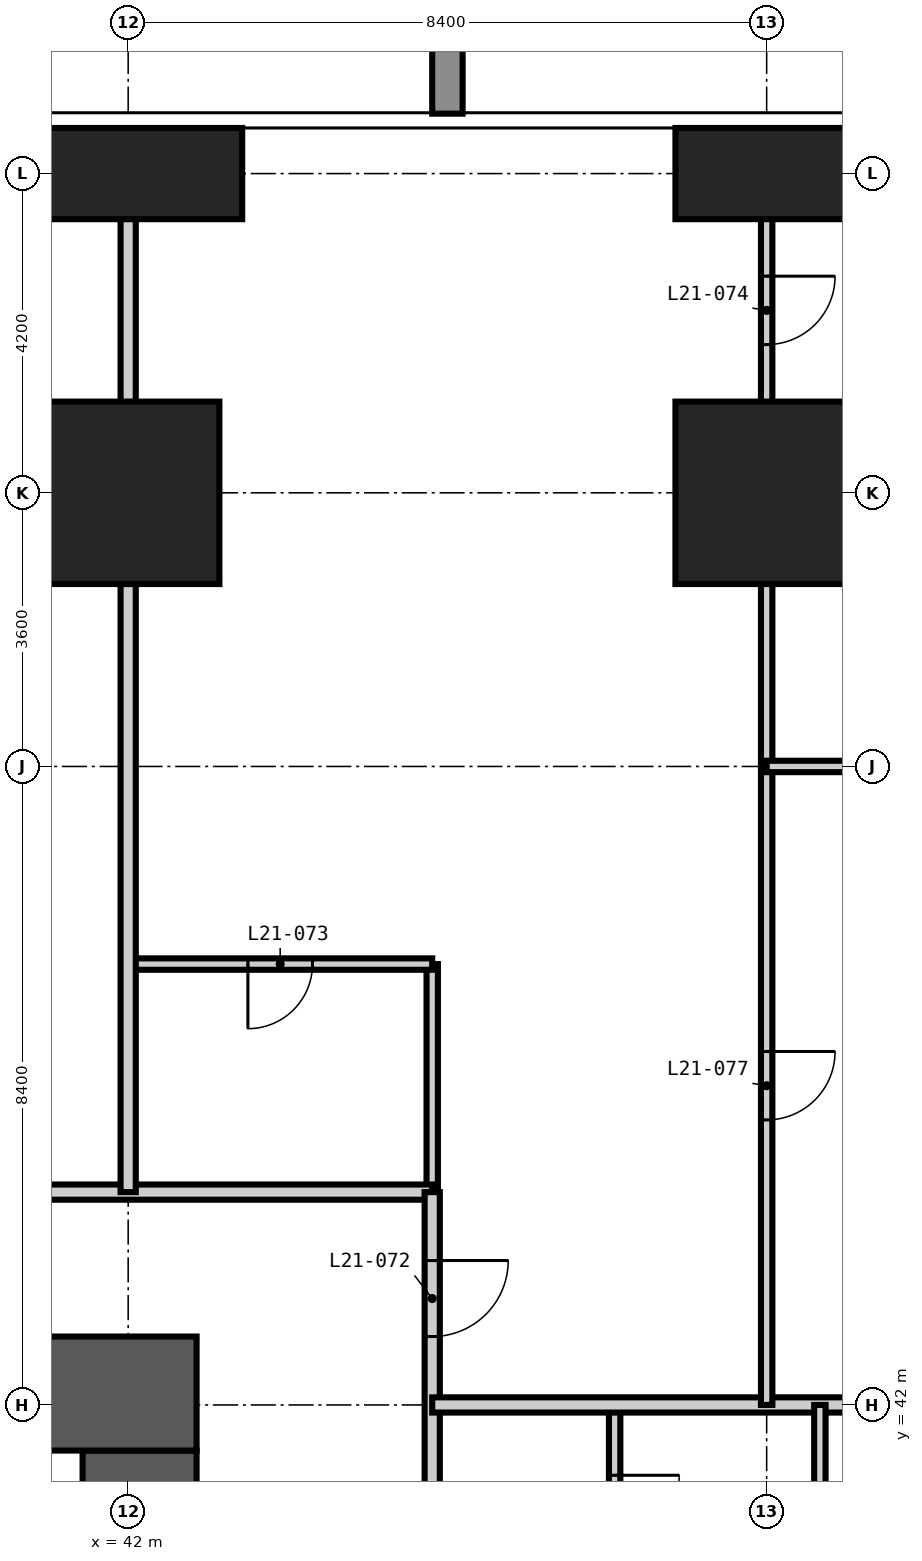
"""IFC4 building model, lengths in metres.
Left out: names, types, materials, properties, quantities, classifications, styles, units other than length and angle.
Written with IfcOpenShell. Run it as: python <this file> out.ifc"""

import sys

from ifc_helpers import new_model, si_unit, direction, frame, frame_2d, origin, origin_2d, place, context, subcontext, project, spatial, rectangle, extrude, element, fill, save


model = new_model("IFC4")
c1 = context("Model", 3, precision=1e-05, world=origin(), true_north=direction((0.0, 1.0)))
c2 = subcontext(c1, "Body", "Model", "MODEL_VIEW")
j1 = project(units=[si_unit("LENGTHUNIT", "METRE"), si_unit("PLANEANGLEUNIT", "RADIAN")], contexts=[c1])
p1 = place(None, origin())
s1 = spatial("IfcSite", under=j1, at=p1, CompositionType="ELEMENT")
p2 = place(p1, origin())
s2 = spatial("IfcBuilding", under=s1, at=p2, CompositionType="ELEMENT")
p3 = place(p2, frame((0.0, 0.0, 84.6)))
s3 = spatial("IfcBuildingStorey", under=s2, at=p3, CompositionType="ELEMENT", Elevation=84.6)
p4 = place(p3, frame((42.0, 54.0, -0.35), z_axis=(0.0, 0.0, 1.0), x_axis=(1.0, 0.0, 0.0)))
e1 = element("IfcColumn", 1, at=p4, inside=s3, PredefinedType="COLUMN", context=c2, shape_type="SweptSolid", body=[
    extrude(rectangle(XDim=2.4, YDim=2.4, at=origin_2d()), origin(), (0.0, 0.0, 1.0), 3.55),
])
p5 = place(p3, frame((42.0, 58.2, -0.35), z_axis=(0.0, 0.0, 1.0), x_axis=(1.0, 0.0, 0.0)))
e2 = element("IfcColumn", 2, at=p5, inside=s3, PredefinedType="COLUMN", context=c2, shape_type="SweptSolid", body=[
    extrude(rectangle(XDim=3.0, YDim=1.2, at=origin_2d()), origin(), (0.0, 0.0, 1.0), 3.55),
])
p6 = place(p3, frame((50.4, 54.0, -0.35), z_axis=(0.0, 0.0, 1.0), x_axis=(1.0, 0.0, 0.0)))
e3 = element("IfcColumn", 3, at=p6, inside=s3, PredefinedType="COLUMN", context=c2, shape_type="SweptSolid", body=[
    extrude(rectangle(XDim=2.4, YDim=2.4, at=origin_2d()), origin(), (0.0, 0.0, 1.0), 3.55),
])
p7 = place(p3, frame((50.4, 58.2, -0.35), z_axis=(0.0, 0.0, 1.0), x_axis=(1.0, 0.0, 0.0)))
e4 = element("IfcColumn", 4, at=p7, inside=s3, PredefinedType="COLUMN", context=c2, shape_type="SweptSolid", body=[
    extrude(rectangle(XDim=2.4, YDim=1.2, at=origin_2d()), origin(), (0.0, 0.0, 1.0), 3.55),
])
p8 = place(p3, frame((42.15, 17.4, -0.35), z_axis=(0.0, 0.0, 1.0), x_axis=(0.0, 1.0, 0.0)))
e5 = element("IfcWall", 5, at=p8, inside=s3, PredefinedType="SHEAR", context=c2, shape_type="SweptSolid", body=[
    extrude(rectangle(XDim=24.0, YDim=1.5, at=frame_2d((12.0, 0.0))), origin(), (0.0, 0.0, 1.0), 3.55),
])
p9 = place(p8, frame((0.2, 0.0, 0.35)))
e6 = element("IfcOpeningElement", 6, at=p9, cuts=e5, PredefinedType="OPENING", context=c2, shape_type="SweptSolid", body=[
    extrude(rectangle(XDim=1.2, YDim=2.2, at=frame_2d((0.6, 1.1))), frame((0.0, 0.76, 0.0), z_axis=(0.0, -1.0, 0.0), x_axis=(1.0, 0.0, 0.0)), (0.0, 0.0, 1.0), 1.52),
])
p10 = place(p8, frame((11.5, 0.0, 0.35)))
e7 = element("IfcOpeningElement", 7, at=p10, cuts=e5, PredefinedType="OPENING", context=c2, shape_type="SweptSolid", body=[
    extrude(rectangle(XDim=1.0, YDim=2.1, at=frame_2d((0.5, 1.05))), frame((0.0, 0.76, 0.0), z_axis=(0.0, -1.0, 0.0), x_axis=(1.0, 0.0, 0.0)), (0.0, 0.0, 1.0), 1.52),
])
p11 = place(p8, frame((19.9, 0.0, 0.35)))
e8 = element("IfcOpeningElement", 8, at=p11, cuts=e5, PredefinedType="OPENING", context=c2, shape_type="SweptSolid", body=[
    extrude(rectangle(XDim=1.0, YDim=2.1, at=frame_2d((0.5, 1.05))), frame((0.0, 0.76, 0.0), z_axis=(0.0, -1.0, 0.0), x_axis=(1.0, 0.0, 0.0)), (0.0, 0.0, 1.0), 1.52),
])
p12 = place(p3, frame((42.9, 42.15, -0.35), z_axis=(0.0, 0.0, 1.0), x_axis=(-1.0, 0.0, 0.0)))
e9 = element("IfcWall", 9, at=p12, inside=s3, PredefinedType="SHEAR", context=c2, shape_type="SweptSolid", body=[
    extrude(rectangle(XDim=27.0, YDim=1.5, at=frame_2d((13.5, 0.0))), origin(), (0.0, 0.0, 1.0), 3.55),
])
p13 = place(p12, frame((21.4, 0.0, 0.35)))
e10 = element("IfcOpeningElement", 10, at=p13, cuts=e9, PredefinedType="OPENING", context=c2, shape_type="SweptSolid", body=[
    extrude(rectangle(XDim=1.0, YDim=2.1, at=frame_2d((0.5, 1.05))), frame((0.0, 0.76, 0.0), z_axis=(0.0, -1.0, 0.0), x_axis=(1.0, 0.0, 0.0)), (0.0, 0.0, 1.0), 1.52),
])
p14 = place(p12, frame((10.8, 0.0, 0.35)))
e11 = element("IfcOpeningElement", 11, at=p14, cuts=e9, PredefinedType="OPENING", context=c2, shape_type="SweptSolid", body=[
    extrude(rectangle(XDim=1.2, YDim=2.2, at=frame_2d((0.6, 1.1))), frame((0.0, 0.76, 0.0), z_axis=(0.0, -1.0, 0.0), x_axis=(1.0, 0.0, 0.0)), (0.0, 0.0, 1.0), 1.52),
])
p15 = place(p3, frame((46.0, 44.8, 0.0), z_axis=(0.0, 0.0, 1.0), x_axis=(0.0, 1.0, 0.0)))
e12 = element("IfcWall", 12, at=p15, inside=s3, PredefinedType="PARTITIONING", context=c2, shape_type="SweptSolid", body=[
    extrude(rectangle(XDim=3.0, YDim=0.15, at=frame_2d((1.5, 0.0))), origin(), (0.0, 0.0, 1.0), 3.2),
])
p16 = place(p3, frame((48.4, 39.3, 0.0), z_axis=(0.0, 0.0, 1.0), x_axis=(0.0, 1.0, 0.0)))
e13 = element("IfcWall", 13, at=p16, inside=s3, PredefinedType="PARTITIONING", context=c2, shape_type="SweptSolid", body=[
    extrude(rectangle(XDim=2.7, YDim=0.15, at=frame_2d((1.35, 0.0))), origin(), (0.0, 0.0, 1.0), 3.2),
])
p17 = place(p16, frame((0.925, 0.0, 0.0)))
e14 = element("IfcOpeningElement", 14, at=p17, cuts=e13, PredefinedType="OPENING", context=c2, shape_type="SweptSolid", body=[
    extrude(rectangle(XDim=0.85, YDim=2.1, at=frame_2d((0.425, 1.05))), frame((0.0, 0.085, 0.0), z_axis=(0.0, -1.0, 0.0), x_axis=(1.0, 0.0, 0.0)), (0.0, 0.0, 1.0), 0.17),
])
p18 = place(p3, frame((42.0, 47.8, 0.0), z_axis=(0.0, 0.0, 1.0), x_axis=(1.0, 0.0, 0.0)))
e15 = element("IfcWall", 15, at=p18, inside=s3, PredefinedType="PARTITIONING", context=c2, shape_type="SweptSolid", body=[
    extrude(rectangle(XDim=4.0, YDim=0.15, at=frame_2d((2.0, 0.0))), origin(), (0.0, 0.0, 1.0), 3.2),
])
p19 = place(p18, frame((1.575, 0.0, 0.0)))
e16 = element("IfcOpeningElement", 16, at=p19, cuts=e15, PredefinedType="OPENING", context=c2, shape_type="SweptSolid", body=[
    extrude(rectangle(XDim=0.85, YDim=2.1, at=frame_2d((0.425, 1.05))), frame((0.0, 0.085, 0.0), z_axis=(0.0, -1.0, 0.0), x_axis=(1.0, 0.0, 0.0)), (0.0, 0.0, 1.0), 0.17),
])
p20 = place(p3, frame((50.4, 54.0, 0.0), z_axis=(0.0, 0.0, 1.0), x_axis=(1.0, 0.0, 0.0)))
e17 = element("IfcWall", 17, at=p20, inside=s3, PredefinedType="PARTITIONING", context=c2, shape_type="SweptSolid", body=[
    extrude(rectangle(XDim=3.0, YDim=0.15, at=frame_2d((1.5, 0.0))), origin(), (0.0, 0.0, 1.0), 3.2),
])
p21 = place(p3, frame((13.4, 44.8, 0.0), z_axis=(0.0, 0.0, 1.0), x_axis=(1.0, 0.0, 0.0)))
e18 = element("IfcWall", 18, at=p21, inside=s3, PredefinedType="PARTITIONING", context=c2, shape_type="SweptSolid", body=[
    extrude(rectangle(XDim=32.6, YDim=0.2, at=frame_2d((16.3, 0.0))), origin(), (0.0, 0.0, 1.0), 3.2),
])
p22 = place(p21, frame((7.1, 0.0, 0.0)))
e19 = element("IfcOpeningElement", 19, at=p22, cuts=e18, PredefinedType="OPENING", context=c2, shape_type="SweptSolid", body=[
    extrude(rectangle(XDim=1.0, YDim=2.2, at=frame_2d((0.5, 1.1))), frame((0.0, 0.11, 0.0), z_axis=(0.0, -1.0, 0.0), x_axis=(1.0, 0.0, 0.0)), (0.0, 0.0, 1.0), 0.22),
])
p23 = place(p21, frame((15.5, 0.0, 0.0)))
e20 = element("IfcOpeningElement", 20, at=p23, cuts=e18, PredefinedType="OPENING", context=c2, shape_type="SweptSolid", body=[
    extrude(rectangle(XDim=1.0, YDim=2.2, at=frame_2d((0.5, 1.1))), frame((0.0, 0.11, 0.0), z_axis=(0.0, -1.0, 0.0), x_axis=(1.0, 0.0, 0.0)), (0.0, 0.0, 1.0), 0.22),
])
p24 = place(p21, frame((23.9, 0.0, 0.0)))
e21 = element("IfcOpeningElement", 21, at=p24, cuts=e18, PredefinedType="OPENING", context=c2, shape_type="SweptSolid", body=[
    extrude(rectangle(XDim=1.0, YDim=2.2, at=frame_2d((0.5, 1.1))), frame((0.0, 0.11, 0.0), z_axis=(0.0, -1.0, 0.0), x_axis=(1.0, 0.0, 0.0)), (0.0, 0.0, 1.0), 0.22),
])
p25 = place(p3, frame((46.0, 44.8, 0.0), z_axis=(0.0, 0.0, 1.0), x_axis=(0.0, -1.0, 0.0)))
e22 = element("IfcWall", 22, at=p25, inside=s3, PredefinedType="PARTITIONING", context=c2, shape_type="SweptSolid", body=[
    extrude(rectangle(XDim=31.4, YDim=0.2, at=frame_2d((15.7, 0.0))), origin(), (0.0, 0.0, 1.0), 3.2),
])
p26 = place(p25, frame((21.2, 0.0, 0.0)))
e23 = element("IfcOpeningElement", 23, at=p26, cuts=e22, PredefinedType="OPENING", context=c2, shape_type="SweptSolid", body=[
    extrude(rectangle(XDim=1.0, YDim=2.2, at=frame_2d((0.5, 1.1))), frame((0.0, 0.11, 0.0), z_axis=(0.0, -1.0, 0.0), x_axis=(1.0, 0.0, 0.0)), (0.0, 0.0, 1.0), 0.22),
])
p27 = place(p25, frame((8.6, 0.0, 0.0)))
e24 = element("IfcOpeningElement", 24, at=p27, cuts=e22, PredefinedType="OPENING", context=c2, shape_type="SweptSolid", body=[
    extrude(rectangle(XDim=1.0, YDim=2.2, at=frame_2d((0.5, 1.1))), frame((0.0, 0.11, 0.0), z_axis=(0.0, -1.0, 0.0), x_axis=(1.0, 0.0, 0.0)), (0.0, 0.0, 1.0), 0.22),
])
p28 = place(p25, frame((29.2, 0.0, 0.0)))
e25 = element("IfcOpeningElement", 25, at=p28, cuts=e22, PredefinedType="OPENING", context=c2, shape_type="SweptSolid", body=[
    extrude(rectangle(XDim=1.0, YDim=2.2, at=frame_2d((0.5, 1.1))), frame((0.0, 0.11, 0.0), z_axis=(0.0, -1.0, 0.0), x_axis=(1.0, 0.0, 0.0)), (0.0, 0.0, 1.0), 0.22),
])
p29 = place(p25, frame((0.9, 0.0, 0.0)))
e26 = element("IfcOpeningElement", 26, at=p29, cuts=e22, PredefinedType="OPENING", context=c2, shape_type="SweptSolid", body=[
    extrude(rectangle(XDim=1.0, YDim=2.2, at=frame_2d((0.5, 1.1))), frame((0.0, 0.11, 0.0), z_axis=(0.0, -1.0, 0.0), x_axis=(1.0, 0.0, 0.0)), (0.0, 0.0, 1.0), 0.22),
])
p30 = place(p3, frame((42.0, 44.8, 0.0), z_axis=(0.0, 0.0, 1.0), x_axis=(0.0, 1.0, 0.0)))
e27 = element("IfcWall", 27, at=p30, inside=s3, PredefinedType="PARTITIONING", context=c2, shape_type="SweptSolid", body=[
    extrude(rectangle(XDim=14.008, YDim=0.2, at=frame_2d((7.004, 0.0))), origin(), (0.0, 0.0, 1.0), 3.2),
])
p31 = place(p3, frame((46.0, 42.0, 0.0), z_axis=(0.0, 0.0, 1.0), x_axis=(1.0, 0.0, 0.0)))
e28 = element("IfcWall", 28, at=p31, inside=s3, PredefinedType="PARTITIONING", context=c2, shape_type="SweptSolid", body=[
    extrude(rectangle(XDim=12.808, YDim=0.2, at=frame_2d((6.404, 0.0))), origin(), (0.0, 0.0, 1.0), 3.2),
])
p32 = place(p3, frame((50.4, 42.0, 0.0), z_axis=(0.0, 0.0, 1.0), x_axis=(0.0, 1.0, 0.0)))
e29 = element("IfcWall", 29, at=p32, inside=s3, PredefinedType="PARTITIONING", context=c2, shape_type="SweptSolid", body=[
    extrude(rectangle(XDim=16.808, YDim=0.15, at=frame_2d((8.404, 0.0))), origin(), (0.0, 0.0, 1.0), 3.2),
])
p33 = place(p32, frame((13.95, 0.0, 0.0)))
e30 = element("IfcOpeningElement", 30, at=p33, cuts=e29, PredefinedType="OPENING", context=c2, shape_type="SweptSolid", body=[
    extrude(rectangle(XDim=0.9, YDim=2.1, at=frame_2d((0.45, 1.05))), frame((0.0, 0.085, 0.0), z_axis=(0.0, -1.0, 0.0), x_axis=(1.0, 0.0, 0.0)), (0.0, 0.0, 1.0), 0.17),
])
p34 = place(p32, frame((3.75, 0.0, 0.0)))
e31 = element("IfcOpeningElement", 31, at=p34, cuts=e29, PredefinedType="OPENING", context=c2, shape_type="SweptSolid", body=[
    extrude(rectangle(XDim=0.9, YDim=2.1, at=frame_2d((0.45, 1.05))), frame((0.0, 0.085, 0.0), z_axis=(0.0, -1.0, 0.0), x_axis=(1.0, 0.0, 0.0)), (0.0, 0.0, 1.0), 0.17),
])
p35 = place(p3, frame((51.1, 39.3, 0.0), z_axis=(0.0, 0.0, 1.0), x_axis=(0.0, 1.0, 0.0)))
e32 = element("IfcWall", 32, at=p35, inside=s3, PredefinedType="PARTITIONING", context=c2, shape_type="SweptSolid", body=[
    extrude(rectangle(XDim=2.7, YDim=0.15, at=frame_2d((1.35, 0.0))), origin(), (0.0, 0.0, 1.0), 3.2),
])
p36 = place(p3, frame((50.4, 50.4, 0.0), z_axis=(0.0, 0.0, 1.0), x_axis=(1.0, 0.0, 0.0)))
e33 = element("IfcWall", 33, at=p36, inside=s3, PredefinedType="PARTITIONING", context=c2, shape_type="SweptSolid", body=[
    extrude(rectangle(XDim=8.408, YDim=0.15, at=frame_2d((4.204, 0.0))), origin(), (0.0, 0.0, 1.0), 3.2),
])
p37 = place(p36, frame((4.85, 0.0, 0.0)))
e34 = element("IfcOpeningElement", 34, at=p37, cuts=e33, PredefinedType="OPENING", context=c2, shape_type="SweptSolid", body=[
    extrude(rectangle(XDim=0.9, YDim=2.1, at=frame_2d((0.45, 1.05))), frame((0.0, 0.085, 0.0), z_axis=(0.0, -1.0, 0.0), x_axis=(1.0, 0.0, 0.0)), (0.0, 0.0, 1.0), 0.17),
])
p38 = place(p17, frame((0.85, 0.0, 0.0), z_axis=(0.0, 0.0, 1.0), x_axis=(-1.0, 0.0, 0.0)))
e35 = element("IfcDoor", 35, at=p38, inside=s3, OperationType="SINGLE_SWING_LEFT", PredefinedType="DOOR", context=c2, shape_type="SweptSolid", body=[
    extrude(rectangle(XDim=0.85, YDim=2.1, at=frame_2d((0.425, 1.05))), frame((0.0, 0.025, 0.0), z_axis=(0.0, -1.0, 0.0), x_axis=(1.0, 0.0, 0.0)), (0.0, 0.0, 1.0), 0.05),
])
fill(e14, e35)
p39 = place(p29, origin())
e36 = element("IfcDoor", 36, at=p39, inside=s3, OperationType="SINGLE_SWING_LEFT", PredefinedType="DOOR", context=c2, shape_type="SweptSolid", body=[
    extrude(rectangle(XDim=1.0, YDim=2.2, at=frame_2d((0.5, 1.1))), frame((0.0, 0.025, 0.0), z_axis=(0.0, -1.0, 0.0), x_axis=(1.0, 0.0, 0.0)), (0.0, 0.0, 1.0), 0.05),
])
fill(e26, e36)
p40 = place(p19, frame((0.85, 0.0, 0.0), z_axis=(0.0, 0.0, 1.0), x_axis=(-1.0, 0.0, 0.0)))
e37 = element("IfcDoor", 37, at=p40, inside=s3, OperationType="SINGLE_SWING_RIGHT", PredefinedType="DOOR", context=c2, shape_type="SweptSolid", body=[
    extrude(rectangle(XDim=0.85, YDim=2.1, at=frame_2d((0.425, 1.05))), frame((0.0, 0.025, 0.0), z_axis=(0.0, -1.0, 0.0), x_axis=(1.0, 0.0, 0.0)), (0.0, 0.0, 1.0), 0.05),
])
fill(e16, e37)
p41 = place(p33, frame((0.9, 0.0, 0.0), z_axis=(0.0, 0.0, 1.0), x_axis=(-1.0, 0.0, 0.0)))
e38 = element("IfcDoor", 38, at=p41, inside=s3, OperationType="SINGLE_SWING_LEFT", PredefinedType="DOOR", context=c2, shape_type="SweptSolid", body=[
    extrude(rectangle(XDim=0.9, YDim=2.1, at=frame_2d((0.45, 1.05))), frame((0.0, 0.025, 0.0), z_axis=(0.0, -1.0, 0.0), x_axis=(1.0, 0.0, 0.0)), (0.0, 0.0, 1.0), 0.05),
])
fill(e30, e38)
p42 = place(p34, frame((0.9, 0.0, 0.0), z_axis=(0.0, 0.0, 1.0), x_axis=(-1.0, 0.0, 0.0)))
e39 = element("IfcDoor", 39, at=p42, inside=s3, OperationType="SINGLE_SWING_LEFT", PredefinedType="DOOR", context=c2, shape_type="SweptSolid", body=[
    extrude(rectangle(XDim=0.9, YDim=2.1, at=frame_2d((0.45, 1.05))), frame((0.0, 0.025, 0.0), z_axis=(0.0, -1.0, 0.0), x_axis=(1.0, 0.0, 0.0)), (0.0, 0.0, 1.0), 0.05),
])
fill(e31, e39)
save(model, sys.argv[1])
